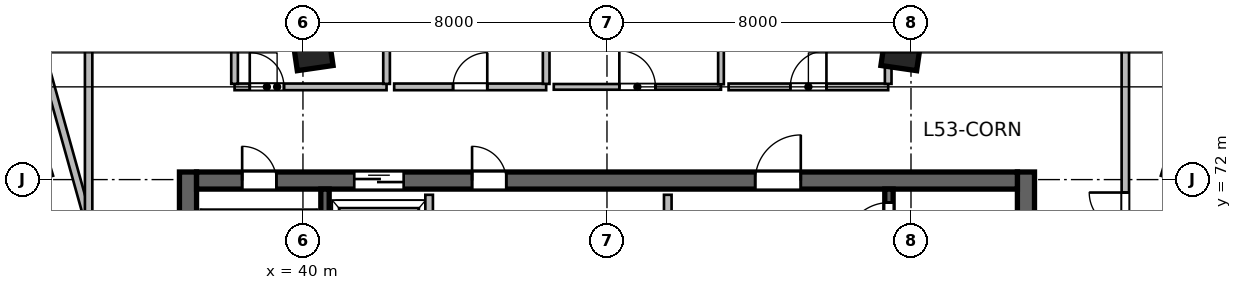
"""IFC4 building model, lengths in metres.
Left out: names, types, materials, properties, quantities, classifications, styles, units other than length and angle.
Written with IfcOpenShell. Run it as: python <this file> out.ifc"""

import sys

from ifc_helpers import new_model, si_unit, direction, frame, frame_2d, origin, origin_2d, place, context, subcontext, project, spatial, rectangle, extrude, source, transform, mapped, element, fill, save


model = new_model("IFC4")
c1 = context("Model", 3, precision=1e-05, world=origin(), true_north=direction((0.0, 1.0)))
c2 = subcontext(c1, "Body", "Model", "MODEL_VIEW")
j1 = project(units=[si_unit("LENGTHUNIT", "METRE"), si_unit("PLANEANGLEUNIT", "RADIAN")], contexts=[c1])
p1 = place(None, origin())
s1 = spatial("IfcSite", under=j1, at=p1, CompositionType="ELEMENT")
p2 = place(p1, origin())
s2 = spatial("IfcBuilding", under=s1, at=p2, CompositionType="ELEMENT")
p3 = place(p2, frame((0.0, 0.0, 219.6)))
s3 = spatial("IfcBuildingStorey", under=s2, at=p3, CompositionType="ELEMENT", Elevation=219.6)
m1 = source(origin(), c2, "Body", "SweptSolid", [
    extrude(rectangle(XDim=12.0, YDim=0.45, at=frame_2d((6.0, 0.0))), origin(), (0.0, 0.0, 1.0), 3.9),
])
for number, where, z_axis, x_axis in (
    (1, (36.975, 60.2, 0.0), (0.0, 0.0, 1.0), (0.0, 1.0, 0.0)),
    (2, (59.025, 60.2, 0.0), (0.0, 0.0, 1.0), (0.0, 1.0, 0.0)),
):
    element("IfcWall", number, at=place(p3, frame(where, z_axis=z_axis, x_axis=x_axis)), inside=s3, PredefinedType="SHEAR", context=c2, shape_type="MappedRepresentation", body=[
        mapped(m1, transform((0.0, 0.0, 0.0), scale=1.0)),
    ])
m2 = source(origin(), c2, "Body", "SweptSolid", [
    extrude(rectangle(XDim=21.6, YDim=0.45, at=frame_2d((10.8, 0.0))), origin(), (0.0, 0.0, 1.0), 3.9),
])
p4 = place(p3, frame((37.2, 71.975, 0.0), z_axis=(0.0, 0.0, 1.0), x_axis=(1.0, 0.0, 0.0)))
e3 = element("IfcWall", 3, at=p4, inside=s3, PredefinedType="SHEAR", context=c2, shape_type="MappedRepresentation", body=[
    mapped(m2, transform((0.0, 0.0, 0.0), scale=1.0)),
])
p5 = place(p4, frame((1.2, 0.0, 0.0)))
e4 = element("IfcOpeningElement", 4, at=p5, cuts=e3, PredefinedType="OPENING", context=c2, shape_type="SweptSolid", body=[
    extrude(rectangle(XDim=0.9, YDim=2.1, at=frame_2d((0.45, 1.05))), frame((0.0, 0.235, 0.0), z_axis=(0.0, -1.0, 0.0), x_axis=(1.0, 0.0, 0.0)), (0.0, 0.0, 1.0), 0.47),
])
p6 = place(p4, frame((14.7, 0.0, 0.0)))
e5 = element("IfcOpeningElement", 5, at=p6, cuts=e3, PredefinedType="OPENING", context=c2, shape_type="SweptSolid", body=[
    extrude(rectangle(XDim=1.2, YDim=2.15, at=frame_2d((0.6, 1.075))), frame((0.0, 0.235, 0.0), z_axis=(0.0, -1.0, 0.0), x_axis=(1.0, 0.0, 0.0)), (0.0, 0.0, 1.0), 0.47),
])
p7 = place(p4, frame((4.15, 0.0, 0.0)))
e6 = element("IfcOpeningElement", 6, at=p7, cuts=e3, PredefinedType="OPENING", context=c2, shape_type="SweptSolid", body=[
    extrude(rectangle(XDim=1.3, YDim=2.15, at=frame_2d((0.65, 1.075))), frame((0.0, 0.235, 0.0), z_axis=(0.0, -1.0, 0.0), x_axis=(1.0, 0.0, 0.0)), (0.0, 0.0, 1.0), 0.47),
])
p8 = place(p4, frame((7.25, 0.0, 0.0)))
e7 = element("IfcOpeningElement", 7, at=p8, cuts=e3, PredefinedType="OPENING", context=c2, shape_type="SweptSolid", body=[
    extrude(rectangle(XDim=0.9, YDim=2.1, at=frame_2d((0.45, 1.05))), frame((0.0, 0.235, 0.0), z_axis=(0.0, -1.0, 0.0), x_axis=(1.0, 0.0, 0.0)), (0.0, 0.0, 1.0), 0.47),
])
m3 = source(origin(), c2, "Body", "SweptSolid", [
    extrude(rectangle(XDim=11.1, YDim=0.22, at=frame_2d((5.55, 0.0))), origin(), (0.0, 0.0, 1.0), 3.9),
])
p9 = place(p3, frame((40.58, 60.65, 0.0), z_axis=(0.0, 0.0, 1.0), x_axis=(0.0, 1.0, 0.0)))
e8 = element("IfcWall", 8, at=p9, inside=s3, PredefinedType="SHEAR", context=c2, shape_type="MappedRepresentation", body=[
    mapped(m3, transform((0.0, 0.0, 0.0), scale=1.0)),
])
p10 = place(p3, frame((55.42, 60.65, 0.0), z_axis=(0.0, 0.0, 1.0), x_axis=(0.0, 1.0, 0.0)))
e9 = element("IfcWall", 9, at=p10, inside=s3, PredefinedType="SHEAR", context=c2, shape_type="MappedRepresentation", body=[
    mapped(m3, transform((0.0, 0.0, 0.0), scale=1.0)),
])
p11 = place(p10, frame((9.595, 0.0, 0.0)))
e10 = element("IfcOpeningElement", 10, at=p11, cuts=e9, PredefinedType="OPENING", context=c2, shape_type="SweptSolid", body=[
    extrude(rectangle(XDim=1.15, YDim=2.15, at=frame_2d((0.575, 1.075))), frame((0.0, 0.12, 0.0), z_axis=(0.0, -1.0, 0.0), x_axis=(1.0, 0.0, 0.0)), (0.0, 0.0, 1.0), 0.24),
])
m4 = source(origin(), c2, "Body", "SweptSolid", [
    extrude(rectangle(XDim=0.95, YDim=0.95, at=origin_2d()), origin(), (0.0, 0.0, 1.0), 3.9),
])
for number, where, z_axis, x_axis in (
    (11, (40.253, 75.404, 0.0), (0.0, 0.0, 1.0), (-0.143, 0.99, 0.0)),
    (12, (55.747, 75.404, 0.0), (0.0, 0.0, 1.0), (0.143, 0.99, 0.0)),
):
    element("IfcColumn", number, at=place(p3, frame(where, z_axis=z_axis, x_axis=x_axis)), inside=s3, PredefinedType="COLUMN", context=c2, shape_type="MappedRepresentation", body=[
        mapped(m4, transform((0.0, 0.0, 0.0), scale=1.0)),
    ])
m5 = source(origin(), c2, "Body", "SweptSolid", [
    extrude(rectangle(XDim=5.8, YDim=0.2, at=frame_2d((2.9, 0.0))), origin(), (0.0, 0.0, 1.0), 3.64),
])
p12 = place(p3, frame((49.6, 65.8, 0.0), z_axis=(0.0, 0.0, 1.0), x_axis=(0.0, 1.0, 0.0)))
e13 = element("IfcWall", 13, at=p12, inside=s3, PredefinedType="SOLIDWALL", context=c2, shape_type="MappedRepresentation", body=[
    mapped(m5, transform((0.0, 0.0, 0.0), scale=1.0)),
])
m6 = source(origin(), c2, "Body", "SweptSolid", [
    extrude(rectangle(XDim=3.2, YDim=0.2, at=frame_2d((1.6, 0.0))), origin(), (0.0, 0.0, 1.0), 3.64),
])
p13 = place(p3, frame((43.32, 68.4, 0.0), z_axis=(0.0, 0.0, 1.0), x_axis=(0.0, 1.0, 0.0)))
e14 = element("IfcWall", 14, at=p13, inside=s3, PredefinedType="SOLIDWALL", context=c2, shape_type="MappedRepresentation", body=[
    mapped(m6, transform((0.0, 0.0, 0.0), scale=1.0)),
])
m7 = source(origin(), c2, "Body", "SweptSolid", [
    extrude(rectangle(XDim=4.0, YDim=0.175, at=frame_2d((2.0, 0.0))), origin(), (0.0, 0.0, 1.0), 3.64),
])
p14 = place(p3, frame((38.2, 74.44, 0.0), z_axis=(0.0, 0.0, 1.0), x_axis=(1.0, 0.0, 0.0)))
e15 = element("IfcWall", 15, at=p14, inside=s3, PredefinedType="PARTITIONING", context=c2, shape_type="MappedRepresentation", body=[
    mapped(m7, transform((0.0, 0.0, 0.0), scale=1.0)),
])
p15 = place(p14, frame((0.4, 0.0, 0.0)))
e16 = element("IfcOpeningElement", 16, at=p15, cuts=e15, PredefinedType="OPENING", context=c2, shape_type="SweptSolid", body=[
    extrude(rectangle(XDim=0.9, YDim=2.08, at=frame_2d((0.45, 1.04))), frame((0.0, 0.098, 0.0), z_axis=(0.0, -1.0, 0.0), x_axis=(1.0, 0.0, 0.0)), (0.0, 0.0, 1.0), 0.195),
])
m8 = source(origin(), c2, "Body", "SweptSolid", [
    extrude(rectangle(XDim=2.403, YDim=0.175, at=frame_2d((1.201, 0.0))), origin(), (0.0, 0.0, 1.0), 3.64),
])
for number, where, z_axis, x_axis in (
    (17, (38.2, 74.519, 0.0), (0.0, 0.0, 1.0), (0.0, 1.0, 0.0)),
    (18, (42.2, 74.519, 0.0), (0.0, 0.0, 1.0), (0.0, 1.0, 0.0)),
):
    element("IfcWall", number, at=place(p3, frame(where, z_axis=z_axis, x_axis=x_axis)), inside=s3, PredefinedType="PARTITIONING", context=c2, shape_type="MappedRepresentation", body=[
        mapped(m8, transform((0.0, 0.0, 0.0), scale=1.0)),
    ])
p16 = place(p3, frame((42.4, 74.44, 0.0), z_axis=(0.0, 0.0, 1.0), x_axis=(1.0, 0.0, 0.0)))
e19 = element("IfcWall", 19, at=p16, inside=s3, PredefinedType="PARTITIONING", context=c2, shape_type="MappedRepresentation", body=[
    mapped(m7, transform((0.0, 0.0, 0.0), scale=1.0)),
])
p17 = place(p16, frame((1.55, 0.0, 0.0)))
e20 = element("IfcOpeningElement", 20, at=p17, cuts=e19, PredefinedType="OPENING", context=c2, shape_type="SweptSolid", body=[
    extrude(rectangle(XDim=0.9, YDim=2.08, at=frame_2d((0.45, 1.04))), frame((0.0, 0.098, 0.0), z_axis=(0.0, -1.0, 0.0), x_axis=(1.0, 0.0, 0.0)), (0.0, 0.0, 1.0), 0.195),
])
p18 = place(p3, frame((46.4, 74.519, 0.0), z_axis=(0.0, 0.0, 1.0), x_axis=(0.0, 1.0, 0.0)))
e21 = element("IfcWall", 21, at=p18, inside=s3, PredefinedType="PARTITIONING", context=c2, shape_type="MappedRepresentation", body=[
    mapped(m8, transform((0.0, 0.0, 0.0), scale=1.0)),
])
m9 = source(origin(), c2, "Body", "SweptSolid", [
    extrude(rectangle(XDim=4.4, YDim=0.15, at=frame_2d((2.2, 0.0))), origin(), (0.0, 0.0, 1.0), 3.64),
])
p19 = place(p3, frame((46.6, 74.44, 0.0), z_axis=(0.0, 0.0, 1.0), x_axis=(1.0, 0.0, 0.0)))
e22 = element("IfcWall", 22, at=p19, inside=s3, PredefinedType="PARTITIONING", context=c2, shape_type="MappedRepresentation", body=[
    mapped(m9, transform((0.0, 0.0, 0.0), scale=1.0)),
])
p20 = place(p19, frame((1.725, 0.0, 0.0)))
e23 = element("IfcOpeningElement", 23, at=p20, cuts=e22, PredefinedType="OPENING", context=c2, shape_type="SweptSolid", body=[
    extrude(rectangle(XDim=0.95, YDim=2.1, at=frame_2d((0.475, 1.05))), frame((0.0, 0.085, 0.0), z_axis=(0.0, -1.0, 0.0), x_axis=(1.0, 0.0, 0.0)), (0.0, 0.0, 1.0), 0.17),
])
m10 = source(origin(), c2, "Body", "SweptSolid", [
    extrude(rectangle(XDim=2.425, YDim=0.15, at=frame_2d((1.212, 0.0))), origin(), (0.0, 0.0, 1.0), 3.64),
])
p21 = place(p3, frame((51.0, 74.508, 0.0), z_axis=(0.0, 0.0, 1.0), x_axis=(0.0, 1.0, 0.0)))
e24 = element("IfcWall", 24, at=p21, inside=s3, PredefinedType="PARTITIONING", context=c2, shape_type="MappedRepresentation", body=[
    mapped(m10, transform((0.0, 0.0, 0.0), scale=1.0)),
])
m11 = source(origin(), c2, "Body", "SweptSolid", [
    extrude(rectangle(XDim=4.2, YDim=0.175, at=frame_2d((2.1, 0.0))), origin(), (0.0, 0.0, 1.0), 3.64),
])
p22 = place(p3, frame((51.2, 74.44, 0.0), z_axis=(0.0, 0.0, 1.0), x_axis=(1.0, 0.0, 0.0)))
e25 = element("IfcWall", 25, at=p22, inside=s3, PredefinedType="PARTITIONING", context=c2, shape_type="MappedRepresentation", body=[
    mapped(m11, transform((0.0, 0.0, 0.0), scale=1.0)),
])
p23 = place(p22, frame((1.625, 0.0, 0.0)))
e26 = element("IfcOpeningElement", 26, at=p23, cuts=e25, PredefinedType="OPENING", context=c2, shape_type="SweptSolid", body=[
    extrude(rectangle(XDim=0.95, YDim=2.12, at=frame_2d((0.475, 1.06))), frame((0.0, 0.098, 0.0), z_axis=(0.0, -1.0, 0.0), x_axis=(1.0, 0.0, 0.0)), (0.0, 0.0, 1.0), 0.195),
])
p24 = place(p3, frame((55.4, 74.519, 0.0), z_axis=(0.0, 0.0, 1.0), x_axis=(0.0, 1.0, 0.0)))
e27 = element("IfcWall", 27, at=p24, inside=s3, PredefinedType="PARTITIONING", context=c2, shape_type="MappedRepresentation", body=[
    mapped(m8, transform((0.0, 0.0, 0.0), scale=1.0)),
])
m12 = source(origin(), c2, "Body", "SweptSolid", [
    extrude(rectangle(XDim=13.694, YDim=0.195, at=frame_2d((6.847, 0.0))), origin(), (0.0, 0.0, 1.0), 3.64),
])
p25 = place(p3, frame((36.5, 63.216, 0.0), z_axis=(0.0, 0.0, 1.0), x_axis=(-0.268753576604, 0.963208967495, 0.0)))
e28 = element("IfcWall", 28, at=p25, inside=s3, PredefinedType="PARTITIONING", context=c2, shape_type="MappedRepresentation", body=[
    mapped(m12, transform((0.0, 0.0, 0.0), scale=1.0)),
])
m13 = source(origin(), c2, "Body", "SweptSolid", [
    extrude(rectangle(XDim=19.209, YDim=0.195, at=frame_2d((9.604, 0.0))), origin(), (0.0, 0.0, 1.0), 3.64),
])
p26 = place(p3, frame((34.36, 57.96, 0.0), z_axis=(0.0, 0.0, 1.0), x_axis=(0.0, 1.0, 0.0)))
e29 = element("IfcWall", 29, at=p26, inside=s3, PredefinedType="PARTITIONING", context=c2, shape_type="MappedRepresentation", body=[
    mapped(m13, transform((0.0, 0.0, 0.0), scale=1.0)),
])
m14 = source(origin(), c2, "Body", "SweptSolid", [
    extrude(rectangle(XDim=11.969, YDim=0.195, at=frame_2d((5.984, 0.0))), origin(), (0.0, 0.0, 1.0), 3.64),
])
p27 = place(p3, frame((61.64, 65.2, 0.0), z_axis=(0.0, 0.0, 1.0), x_axis=(0.0, 1.0, 0.0)))
e30 = element("IfcWall", 30, at=p27, inside=s3, PredefinedType="PARTITIONING", context=c2, shape_type="MappedRepresentation", body=[
    mapped(m14, transform((0.0, 0.0, 0.0), scale=1.0)),
])
p28 = place(p27, frame((5.51, 0.0, 0.0)))
e31 = element("IfcOpeningElement", 31, at=p28, cuts=e30, PredefinedType="OPENING", context=c2, shape_type="SweptSolid", body=[
    extrude(rectangle(XDim=0.95, YDim=2.1, at=frame_2d((0.475, 1.05))), frame((0.0, 0.107, 0.0), z_axis=(0.0, -1.0, 0.0), x_axis=(1.0, 0.0, 0.0)), (0.0, 0.0, 1.0), 0.215),
])
m15 = source(origin(), c2, "Body", "SweptSolid", [
    extrude(rectangle(XDim=0.9, YDim=2.1, at=frame_2d((0.45, 1.05))), frame((0.0, 0.025, 0.0), z_axis=(0.0, -1.0, 0.0), x_axis=(1.0, 0.0, 0.0)), (0.0, 0.0, 1.0), 0.05),
])
p29 = place(p5, origin())
e32 = element("IfcDoor", 32, at=p29, inside=s3, OperationType="SINGLE_SWING_LEFT", PredefinedType="DOOR", context=c2, shape_type="MappedRepresentation", body=[
    mapped(m15, transform((0.0, 0.0, 0.0), scale=1.0)),
])
fill(e4, e32)
m16 = source(origin(), c2, "Body", "SweptSolid", [
    extrude(rectangle(XDim=1.15, YDim=2.15, at=frame_2d((0.575, 1.075))), frame((0.0, 0.025, 0.0), z_axis=(0.0, -1.0, 0.0), x_axis=(1.0, 0.0, 0.0)), (0.0, 0.0, 1.0), 0.05),
])
p30 = place(p11, origin())
e33 = element("IfcDoor", 33, at=p30, inside=s3, OperationType="SINGLE_SWING_LEFT", PredefinedType="DOOR", context=c2, shape_type="MappedRepresentation", body=[
    mapped(m16, transform((0.0, 0.0, 0.0), scale=1.0)),
])
fill(e10, e33)
m17 = source(origin(), c2, "Body", "SweptSolid", [
    extrude(rectangle(XDim=1.2, YDim=2.15, at=frame_2d((0.6, 1.075))), frame((0.0, 0.025, 0.0), z_axis=(0.0, -1.0, 0.0), x_axis=(1.0, 0.0, 0.0)), (0.0, 0.0, 1.0), 0.05),
])
p31 = place(p6, origin())
e34 = element("IfcDoor", 34, at=p31, inside=s3, OperationType="SINGLE_SWING_RIGHT", PredefinedType="DOOR", context=c2, shape_type="MappedRepresentation", body=[
    mapped(m17, transform((0.0, 0.0, 0.0), scale=1.0)),
])
fill(e5, e34)
m18 = source(origin(), c2, "Body", "SweptSolid", [
    extrude(rectangle(XDim=1.3, YDim=2.15, at=frame_2d((0.65, 1.075))), frame((0.0, 0.025, 0.0), z_axis=(0.0, -1.0, 0.0), x_axis=(1.0, 0.0, 0.0)), (0.0, 0.0, 1.0), 0.05),
])
p32 = place(p7, origin())
e35 = element("IfcDoor", 35, at=p32, inside=s3, OperationType="DOUBLE_DOOR_SLIDING", PredefinedType="DOOR", context=c2, shape_type="MappedRepresentation", body=[
    mapped(m18, transform((0.0, 0.0, 0.0), scale=1.0)),
])
fill(e6, e35)
p33 = place(p8, origin())
e36 = element("IfcDoor", 36, at=p33, inside=s3, OperationType="SINGLE_SWING_LEFT", PredefinedType="DOOR", context=c2, shape_type="MappedRepresentation", body=[
    mapped(m15, transform((0.0, 0.0, 0.0), scale=1.0)),
])
fill(e7, e36)
m19 = source(origin(), c2, "Body", "SweptSolid", [
    extrude(rectangle(XDim=0.9, YDim=2.08, at=frame_2d((0.45, 1.04))), frame((0.0, 0.025, 0.0), z_axis=(0.0, -1.0, 0.0), x_axis=(1.0, 0.0, 0.0)), (0.0, 0.0, 1.0), 0.05),
])
p34 = place(p15, origin())
e37 = element("IfcDoor", 37, at=p34, inside=s3, OperationType="SINGLE_SWING_LEFT", PredefinedType="DOOR", context=c2, shape_type="MappedRepresentation", body=[
    mapped(m19, transform((0.0, 0.0, 0.0), scale=1.0)),
])
fill(e16, e37)
p35 = place(p17, origin())
e38 = element("IfcDoor", 38, at=p35, inside=s3, OperationType="SINGLE_SWING_RIGHT", PredefinedType="DOOR", context=c2, shape_type="MappedRepresentation", body=[
    mapped(m19, transform((0.0, 0.0, 0.0), scale=1.0)),
])
fill(e20, e38)
m20 = source(origin(), c2, "Body", "SweptSolid", [
    extrude(rectangle(XDim=0.95, YDim=2.1, at=frame_2d((0.475, 1.05))), frame((0.0, 0.025, 0.0), z_axis=(0.0, -1.0, 0.0), x_axis=(1.0, 0.0, 0.0)), (0.0, 0.0, 1.0), 0.05),
])
p36 = place(p20, origin())
e39 = element("IfcDoor", 39, at=p36, inside=s3, OperationType="SINGLE_SWING_LEFT", PredefinedType="DOOR", context=c2, shape_type="MappedRepresentation", body=[
    mapped(m20, transform((0.0, 0.0, 0.0), scale=1.0)),
])
fill(e23, e39)
m21 = source(origin(), c2, "Body", "SweptSolid", [
    extrude(rectangle(XDim=0.95, YDim=2.12, at=frame_2d((0.475, 1.06))), frame((0.0, 0.025, 0.0), z_axis=(0.0, -1.0, 0.0), x_axis=(1.0, 0.0, 0.0)), (0.0, 0.0, 1.0), 0.05),
])
p37 = place(p23, origin())
e40 = element("IfcDoor", 40, at=p37, inside=s3, OperationType="SINGLE_SWING_RIGHT", PredefinedType="DOOR", context=c2, shape_type="MappedRepresentation", body=[
    mapped(m21, transform((0.0, 0.0, 0.0), scale=1.0)),
])
fill(e26, e40)
p38 = place(p28, origin())
e41 = element("IfcDoor", 41, at=p38, inside=s3, OperationType="SINGLE_SWING_RIGHT", PredefinedType="DOOR", context=c2, shape_type="MappedRepresentation", body=[
    mapped(m20, transform((0.0, 0.0, 0.0), scale=1.0)),
])
fill(e31, e41)
save(model, sys.argv[1])
